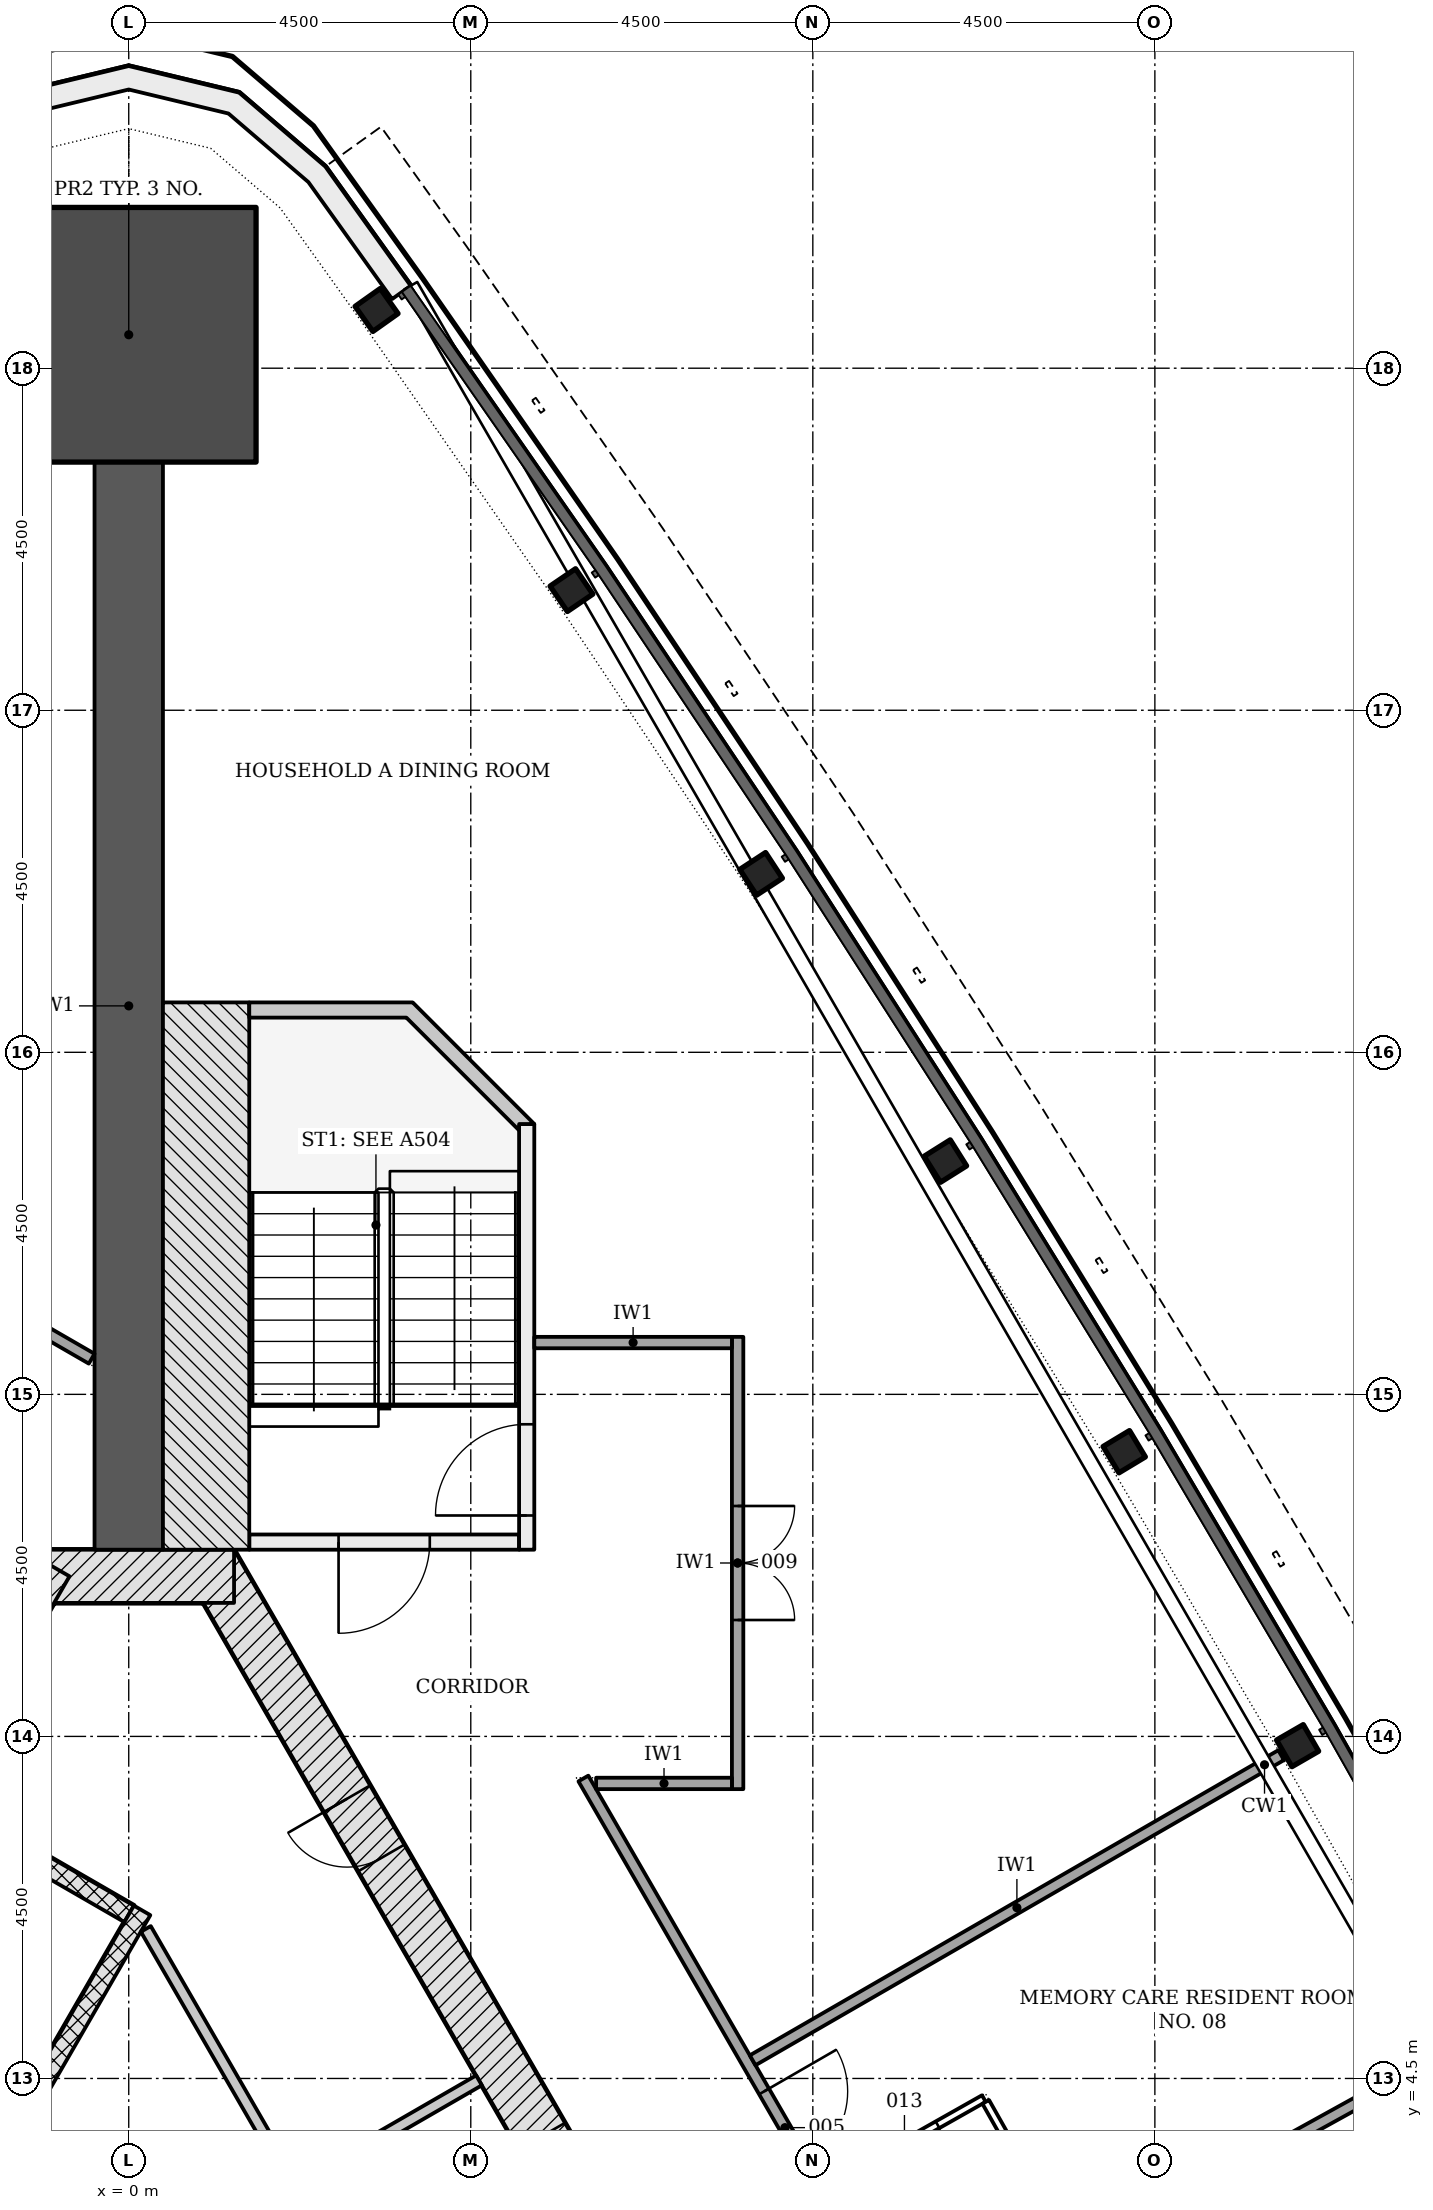
"""IFC4 building model, lengths in metres.
Left out: names, types, materials, properties, quantities, classifications, styles, units other than length and angle.
Written with IfcOpenShell. Run it as: python <this file> out.ifc"""

import sys

from ifc_helpers import new_model, si_unit, direction, frame, frame_2d, origin, origin_2d, place, context, subcontext, project, spatial, polyline, rectangle, i_section, outline, extrude, element, fill, save


model = new_model("IFC4")
c1 = context("Model", 3, precision=1e-05, world=origin(), true_north=direction((0.0, 1.0)))
c2 = subcontext(c1, "Body", "Model", "MODEL_VIEW")
j1 = project(units=[si_unit("LENGTHUNIT", "METRE"), si_unit("PLANEANGLEUNIT", "RADIAN")], contexts=[c1])
p1 = place(None, origin())
s1 = spatial("IfcSite", under=j1, at=p1, CompositionType="ELEMENT")
p2 = place(p1, origin())
s2 = spatial("IfcBuilding", under=s1, at=p2, CompositionType="ELEMENT")
p3 = place(p2, frame((0.0, 0.0, 34.8)))
s3 = spatial("IfcBuildingStorey", under=s2, at=p3, CompositionType="ELEMENT", Elevation=34.8)
p4 = place(p3, frame((10.311, -4.703, -0.2), z_axis=(0.0, 0.0, 1.0), x_axis=(-0.500001446645, 0.866024568562, 0.0)))
e1 = element("IfcWall", 1, at=p4, inside=s3, PredefinedType="SHEAR", context=c2, shape_type="SweptSolid", body=[
    extrude(rectangle(XDim=18.458, YDim=0.7, at=frame_2d((9.229, 0.0))), origin(), (0.0, 0.0, 1.0), 3.6),
])
p5 = place(p4, frame((6.5, 0.0, 0.2)))
e2 = element("IfcOpeningElement", 2, at=p5, cuts=e1, PredefinedType="OPENING", context=c2, shape_type="SweptSolid", body=[
    extrude(rectangle(XDim=1.0, YDim=2.1, at=frame_2d((0.5, 1.05))), frame((0.0, 0.36, 0.0), z_axis=(0.0, -1.0, 0.0), x_axis=(1.0, 0.0, 0.0)), (0.0, 0.0, 1.0), 0.72),
])
p6 = place(p4, frame((2.902, 0.0, 0.2)))
e3 = element("IfcOpeningElement", 3, at=p6, cuts=e1, PredefinedType="OPENING", context=c2, shape_type="SweptSolid", body=[
    extrude(rectangle(XDim=0.9, YDim=2.1, at=frame_2d((0.45, 1.05))), frame((0.0, 0.36, 0.0), z_axis=(0.0, -1.0, 0.0), x_axis=(1.0, 0.0, 0.0)), (0.0, 0.0, 1.0), 0.72),
])
p7 = place(p4, frame((8.75, 0.0, 0.2)))
e4 = element("IfcOpeningElement", 4, at=p7, cuts=e1, PredefinedType="OPENING", context=c2, shape_type="SweptSolid", body=[
    extrude(rectangle(XDim=1.0, YDim=2.1, at=frame_2d((0.5, 1.05))), frame((0.0, 0.36, 0.0), z_axis=(0.0, -1.0, 0.0), x_axis=(1.0, 0.0, 0.0)), (0.0, 0.0, 1.0), 0.72),
])
p8 = place(p4, frame((13.977, 0.0, 0.2)))
e5 = element("IfcOpeningElement", 5, at=p8, cuts=e1, PredefinedType="OPENING", context=c2, shape_type="SweptSolid", body=[
    extrude(rectangle(XDim=0.9, YDim=2.1, at=frame_2d((0.45, 1.05))), frame((0.0, 0.36, 0.0), z_axis=(0.0, -1.0, 0.0), x_axis=(1.0, 0.0, 0.0)), (0.0, 0.0, 1.0), 0.72),
])
p9 = place(p3, frame((1.386, 11.106, -0.2), z_axis=(0.0, 0.0, 1.0), x_axis=(-1.0, 0.0, 0.0)))
e6 = element("IfcWall", 6, at=p9, inside=s3, PredefinedType="SHEAR", context=c2, shape_type="SweptSolid", body=[
    extrude(rectangle(XDim=2.771, YDim=0.7, at=frame_2d((1.386, 0.0))), origin(), (0.0, 0.0, 1.0), 3.6),
])
p10 = place(p3, frame((-1.083, 11.281, -0.2), z_axis=(0.0, 0.0, 1.0), x_axis=(-0.500001446645, -0.866024568562, 0.0)))
e7 = element("IfcWall", 7, at=p10, inside=s3, PredefinedType="SHEAR", context=c2, shape_type="SweptSolid", body=[
    extrude(rectangle(XDim=18.458, YDim=0.7, at=frame_2d((9.229, 0.0))), origin(), (0.0, 0.0, 1.0), 3.6),
])
p11 = place(p10, frame((8.979, 0.0, 0.2)))
e8 = element("IfcOpeningElement", 8, at=p11, cuts=e7, PredefinedType="OPENING", context=c2, shape_type="SweptSolid", body=[
    extrude(rectangle(XDim=1.2, YDim=2.1, at=frame_2d((0.6, 1.05))), frame((0.0, 0.36, 0.0), z_axis=(0.0, -1.0, 0.0), x_axis=(1.0, 0.0, 0.0)), (0.0, 0.0, 1.0), 0.72),
])
p12 = place(p10, frame((11.029, 0.0, 0.2)))
e9 = element("IfcOpeningElement", 9, at=p12, cuts=e7, PredefinedType="OPENING", context=c2, shape_type="SweptSolid", body=[
    extrude(rectangle(XDim=1.2, YDim=2.1, at=frame_2d((0.6, 1.05))), frame((0.0, 0.36, 0.0), z_axis=(0.0, -1.0, 0.0), x_axis=(1.0, 0.0, 0.0)), (0.0, 0.0, 1.0), 0.72),
])
p13 = place(p3, frame((0.0, 11.456, -0.2), z_axis=(0.0, 0.0, 1.0), x_axis=(0.0, 1.0, 0.0)))
e10 = element("IfcWall", 10, at=p13, inside=s3, PredefinedType="SHEAR", context=c2, shape_type="SweptSolid", body=[
    extrude(rectangle(XDim=14.309, YDim=0.9, at=frame_2d((7.154, 0.0))), origin(), (0.0, 0.0, 1.0), 3.6),
])
p14 = place(p3, frame((0.0, 27.44, -0.2), z_axis=(0.0, 0.0, 1.0), x_axis=(0.0, 1.0, 0.0)))
e11 = element("IfcColumn", 11, at=p14, inside=s3, PredefinedType="COLUMN", context=c2, shape_type="SweptSolid", body=[
    extrude(rectangle(XDim=3.35, YDim=3.35, at=origin_2d()), origin(), (0.0, 0.0, 1.0), 3.6),
])
for number, where, z_axis, x_axis in (
    (12, (15.378, 8.878, -0.2), (0.0, 0.0, 1.0), (-0.5, 0.866, 0.0)),
    (13, (13.097, 12.745, -0.2), (0.0, 0.0, 1.0), (-0.516, 0.857, 0.0)),
    (14, (10.744, 16.569, -0.2), (0.0, 0.0, 1.0), (-0.532, 0.847, 0.0)),
    (15, (8.319, 20.348, -0.2), (0.0, 0.0, 1.0), (-0.548, 0.837, 0.0)),
    (16, (5.825, 24.081, -0.2), (0.0, 0.0, 1.0), (-0.563, 0.826, 0.0)),
    (17, (3.26, 27.766, -0.2), (0.0, 0.0, 1.0), (-0.579, 0.815, 0.0)),
):
    element("IfcColumn", number, at=place(p3, frame(where, z_axis=z_axis, x_axis=x_axis)), inside=s3, PredefinedType="COLUMN", context=c2, shape_type="SweptSolid", body=[
        extrude(i_section(OverallWidth=0.404, OverallDepth=0.406, WebThickness=0.027, FlangeThickness=0.044, FilletRadius=0.015, at=origin_2d()), origin(), (0.0, 0.0, 1.0), 3.6),
    ])
p15 = place(p3, origin())
e18 = element("IfcWall", 18, at=p15, inside=s3, PredefinedType="NOTDEFINED", context=c2, shape_type="SweptSolid", body=[
    extrude(outline(polyline([(3.709, 28.084), (2.586, 29.652), (1.453, 30.625), (0.0, 30.975), (-1.453, 30.625), (-2.586, 29.652), (-3.709, 28.084), (-3.465, 27.91), (-2.364, 29.448), (-1.312, 30.351), (0.0, 30.667), (1.312, 30.351), (2.364, 29.448), (3.465, 27.91), (3.709, 28.084)])), origin(), (0.0, 0.0, 1.0), 3.3),
])
p16 = place(p3, frame((-2.506, 8.115, -0.2), z_axis=(0.0, 0.0, 1.0), x_axis=(0.865996321171, -0.50005036918, 0.0)))
e19 = element("IfcWall", 19, at=p16, inside=s3, PredefinedType="PARTITIONING", context=c2, shape_type="SweptSolid", body=[
    extrude(rectangle(XDim=2.9, YDim=0.25, at=frame_2d((1.45, 0.0))), origin(), (0.0, 0.0, 1.0), 3.6),
])
p17 = place(p3, frame((0.176, 6.711, 0.0), z_axis=(0.0, 0.0, 1.0), x_axis=(-0.500004227369, -0.866022963098, 0.0)))
e20 = element("IfcWall", 20, at=p17, inside=s3, PredefinedType="PARTITIONING", context=c2, shape_type="SweptSolid", body=[
    extrude(rectangle(XDim=11.8, YDim=0.25, at=frame_2d((5.9, 0.0))), origin(), (0.0, 0.0, 1.0), 3.4),
])
p18 = place(p3, frame((3.546, 0.715, 0.0), z_axis=(0.0, 0.0, 1.0), x_axis=(-0.50002895357, 0.866008686788, 0.0)))
e21 = element("IfcWall", 21, at=p18, inside=s3, PredefinedType="PARTITIONING", context=c2, shape_type="SweptSolid", body=[
    extrude(rectangle(XDim=6.642, YDim=0.15, at=frame_2d((3.321, 0.0))), origin(), (0.0, 0.0, 1.0), 3.4),
])
p19 = place(p3, frame((2.248, 3.112, 0.0), z_axis=(0.0, 0.0, 1.0), x_axis=(0.866012511928, 0.500022328685, 0.0)))
e22 = element("IfcWall", 22, at=p19, inside=s3, PredefinedType="PARTITIONING", context=c2, shape_type="SweptSolid", body=[
    extrude(rectangle(XDim=2.725, YDim=0.15, at=frame_2d((1.363, 0.0))), origin(), (0.0, 0.0, 1.0), 3.4),
])
p20 = place(p3, frame((5.135, 11.556, -0.2), z_axis=(0.0, 0.0, 1.0), x_axis=(-1.0, 0.0, 0.0)))
e23 = element("IfcWall", 23, at=p20, inside=s3, PredefinedType="SHEAR", context=c2, shape_type="SweptSolid", body=[
    extrude(rectangle(XDim=3.55, YDim=0.2, at=frame_2d((1.775, 0.0))), origin(), (0.0, 0.0, 1.0), 3.6),
])
p21 = place(p20, frame((1.175, 0.0, 0.2)))
e24 = element("IfcOpeningElement", 24, at=p21, cuts=e23, PredefinedType="OPENING", context=c2, shape_type="SweptSolid", body=[
    extrude(rectangle(XDim=1.2, YDim=2.1, at=frame_2d((0.6, 1.05))), frame((0.0, 0.11, 0.0), z_axis=(0.0, -1.0, 0.0), x_axis=(1.0, 0.0, 0.0)), (0.0, 0.0, 1.0), 0.22),
])
p22 = place(p3, frame((5.236, 11.456, -0.2), z_axis=(0.0, 0.0, 1.0), x_axis=(0.0, 1.0, 0.0)))
e25 = element("IfcWall", 25, at=p22, inside=s3, PredefinedType="SHEAR", context=c2, shape_type="SweptSolid", body=[
    extrude(rectangle(XDim=5.6, YDim=0.2, at=frame_2d((2.8, 0.0))), origin(), (0.0, 0.0, 1.0), 3.6),
])
p23 = place(p22, frame((0.45, 0.0, 0.2)))
e26 = element("IfcOpeningElement", 26, at=p23, cuts=e25, PredefinedType="OPENING", context=c2, shape_type="SweptSolid", body=[
    extrude(rectangle(XDim=1.2, YDim=2.1, at=frame_2d((0.6, 1.05))), frame((0.0, 0.11, 0.0), z_axis=(0.0, -1.0, 0.0), x_axis=(1.0, 0.0, 0.0)), (0.0, 0.0, 1.0), 0.22),
])
p24 = place(p3, frame((1.018, 11.456, -0.2), z_axis=(0.0, 0.0, 1.0), x_axis=(0.0, 1.0, 0.0)))
e27 = element("IfcWall", 27, at=p24, inside=s3, PredefinedType="SHEAR", context=c2, shape_type="SweptSolid", body=[
    extrude(rectangle(XDim=7.2, YDim=1.136, at=frame_2d((3.6, 0.0))), origin(), (0.0, 0.0, 1.0), 3.6),
])
p25 = place(p3, frame((0.0, 0.0, -0.2)))
e28 = element("IfcWall", 28, at=p25, inside=s3, PredefinedType="SHEAR", context=c2, shape_type="SweptSolid", body=[
    extrude(outline(polyline([(5.336, 17.056), (3.736, 18.656), (1.586, 18.656), (1.586, 18.456), (3.653, 18.456), (5.135, 16.974), (5.135, 17.056), (5.135, 17.056), (5.135, 17.056), (5.135, 17.056), (5.135, 17.056), (5.135, 17.056), (5.135, 17.056), (5.135, 17.056), (5.135, 17.056), (5.135, 17.056), (5.135, 17.056), (5.135, 17.056), (5.135, 17.056), (5.135, 17.056), (5.135, 17.056), (5.135, 17.056), (5.135, 17.056), (5.336, 17.056)])), origin(), (0.0, 0.0, 1.0), 3.6),
])
p26 = place(p3, frame((5.981, 8.446, 0.0), z_axis=(0.0, 0.0, 1.0), x_axis=(0.499996620721, -0.866027354803, 0.0)))
e29 = element("IfcWall", 29, at=p26, inside=s3, PredefinedType="PARTITIONING", context=c2, shape_type="SweptSolid", body=[
    extrude(rectangle(XDim=15.057, YDim=0.15, at=frame_2d((7.528, 0.0))), origin(), (0.0, 0.0, 1.0), 2.768),
])
p27 = place(p26, frame((11.311, 0.0, 0.0)))
e30 = element("IfcOpeningElement", 30, at=p27, cuts=e29, PredefinedType="OPENING", context=c2, shape_type="SweptSolid", body=[
    extrude(rectangle(XDim=1.0, YDim=2.1, at=frame_2d((0.5, 1.05))), frame((0.0, 0.085, 0.0), z_axis=(0.0, -1.0, 0.0), x_axis=(1.0, 0.0, 0.0)), (0.0, 0.0, 1.0), 0.17),
])
p28 = place(p26, frame((4.754, 0.0, 0.0)))
e31 = element("IfcOpeningElement", 31, at=p28, cuts=e29, PredefinedType="OPENING", context=c2, shape_type="SweptSolid", body=[
    extrude(rectangle(XDim=1.1, YDim=2.1, at=frame_2d((0.55, 1.05))), frame((0.0, 0.085, 0.0), z_axis=(0.0, -1.0, 0.0), x_axis=(1.0, 0.0, 0.0)), (0.0, 0.0, 1.0), 0.17),
])
p29 = place(p3, frame((8.01, 14.256, 0.0), z_axis=(0.0, 0.0, 1.0), x_axis=(0.0, -1.0, 0.0)))
e32 = element("IfcWall", 32, at=p29, inside=s3, PredefinedType="PARTITIONING", context=c2, shape_type="SweptSolid", body=[
    extrude(rectangle(XDim=5.95, YDim=0.15, at=frame_2d((2.975, 0.0))), origin(), (0.0, 0.0, 1.0), 2.768),
])
p30 = place(p29, frame((2.225, 0.0, 0.0)))
e33 = element("IfcOpeningElement", 33, at=p30, cuts=e32, PredefinedType="OPENING", context=c2, shape_type="SweptSolid", body=[
    extrude(rectangle(XDim=1.5, YDim=2.1, at=frame_2d((0.75, 1.05))), frame((0.0, 0.085, 0.0), z_axis=(0.0, -1.0, 0.0), x_axis=(1.0, 0.0, 0.0)), (0.0, 0.0, 1.0), 0.17),
])
p31 = place(p3, frame((-5.312, 16.755, 0.0), z_axis=(0.0, 0.0, 1.0), x_axis=(0.866028693448, -0.499994302092, 0.0)))
e34 = element("IfcWall", 34, at=p31, inside=s3, PredefinedType="PARTITIONING", context=c2, shape_type="SweptSolid", body=[
    extrude(rectangle(XDim=5.571, YDim=0.15, at=frame_2d((2.786, 0.0))), origin(), (0.0, 0.0, 1.0), 3.4),
])
p32 = place(p31, frame((2.295, 0.0, 0.0)))
e35 = element("IfcOpeningElement", 35, at=p32, cuts=e34, PredefinedType="OPENING", context=c2, shape_type="SweptSolid", body=[
    extrude(rectangle(XDim=1.0, YDim=2.1, at=frame_2d((0.5, 1.05))), frame((0.0, 0.085, 0.0), z_axis=(0.0, -1.0, 0.0), x_axis=(1.0, 0.0, 0.0)), (0.0, 0.0, 1.0), 0.17),
])
p33 = place(p3, frame((5.336, 14.181, 0.0), z_axis=(0.0, 0.0, 1.0), x_axis=(1.0, 0.0, 0.0)))
e36 = element("IfcWall", 36, at=p33, inside=s3, PredefinedType="PARTITIONING", context=c2, shape_type="SweptSolid", body=[
    extrude(rectangle(XDim=2.6, YDim=0.15, at=frame_2d((1.3, 0.0))), origin(), (0.0, 0.0, 1.0), 2.923),
])
p34 = place(p3, frame((6.149, 8.381, 0.0), z_axis=(0.0, 0.0, 1.0), x_axis=(1.0, 0.0, 0.0)))
e37 = element("IfcWall", 37, at=p34, inside=s3, PredefinedType="PARTITIONING", context=c2, shape_type="SweptSolid", body=[
    extrude(rectangle(XDim=1.787, YDim=0.15, at=frame_2d((0.894, 0.0))), origin(), (0.0, 0.0, 1.0), 2.768),
])
p35 = place(p3, frame((15.161, 8.753, 0.0), z_axis=(0.0, 0.0, 1.0), x_axis=(-0.86601695431, -0.500014634633, 0.0)))
e38 = element("IfcWall", 38, at=p35, inside=s3, PredefinedType="PARTITIONING", context=c2, shape_type="SweptSolid", body=[
    extrude(rectangle(XDim=8.029, YDim=0.15, at=frame_2d((4.014, 0.0))), origin(), (0.0, 0.0, 1.0), 2.768),
])
p36 = place(p3, frame((17.367, 4.848, 0.0), z_axis=(0.0, 0.0, 1.0), x_axis=(-0.875233702412, -0.483700285469, 0.0)))
e39 = element("IfcWall", 39, at=p36, inside=s3, PredefinedType="PARTITIONING", context=c2, shape_type="SweptSolid", body=[
    extrude(rectangle(XDim=7.986, YDim=0.15, at=frame_2d((3.993, 0.0))), origin(), (0.0, 0.0, 1.0), 2.768),
])
p37 = place(p3, frame((11.25, 4.235, 0.0), z_axis=(0.0, 0.0, 1.0), x_axis=(-0.870673532045, -0.491861363188, 0.0)))
e40 = element("IfcWall", 40, at=p37, inside=s3, PredefinedType="PARTITIONING", context=c2, shape_type="SweptSolid", body=[
    extrude(rectangle(XDim=2.382, YDim=0.1, at=frame_2d((1.191, 0.0))), origin(), (0.0, 0.0, 1.0), 3.4),
])
p38 = place(p37, frame((0.7, 0.0, 0.0)))
e41 = element("IfcOpeningElement", 41, at=p38, cuts=e40, PredefinedType="OPENING", context=c2, shape_type="SweptSolid", body=[
    extrude(rectangle(XDim=1.0, YDim=2.1, at=frame_2d((0.5, 1.05))), frame((0.0, 0.06, 0.0), z_axis=(0.0, -1.0, 0.0), x_axis=(1.0, 0.0, 0.0)), (0.0, 0.0, 1.0), 0.12),
])
p39 = place(p3, frame((12.405, 2.192, 0.0), z_axis=(0.0, 0.0, 1.0), x_axis=(-0.491840077016, 0.870685556697, 0.0)))
e42 = element("IfcWall", 42, at=p39, inside=s3, PredefinedType="PARTITIONING", context=c2, shape_type="SweptSolid", body=[
    extrude(rectangle(XDim=2.297, YDim=0.1, at=frame_2d((1.148, 0.0))), origin(), (0.0, 0.0, 1.0), 2.768),
])
p40 = place(p8, origin())
e43 = element("IfcDoor", 43, at=p40, inside=s3, OperationType="SINGLE_SWING_RIGHT", PredefinedType="DOOR", context=c2, shape_type="SweptSolid", body=[
    extrude(rectangle(XDim=0.9, YDim=2.1, at=frame_2d((0.45, 1.05))), frame((0.0, 0.075, 0.0), z_axis=(0.0, -1.0, 0.0), x_axis=(1.0, 0.0, 0.0)), (0.0, 0.0, 1.0), 0.15),
])
fill(e5, e43)
p41 = place(p21, origin())
e44 = element("IfcDoor", 44, at=p41, inside=s3, OperationType="SINGLE_SWING_RIGHT", PredefinedType="DOOR", context=c2, shape_type="SweptSolid", body=[
    extrude(rectangle(XDim=1.2, YDim=2.1, at=frame_2d((0.6, 1.05))), frame((0.0, 0.025, 0.0), z_axis=(0.0, -1.0, 0.0), x_axis=(1.0, 0.0, 0.0)), (0.0, 0.0, 1.0), 0.05),
])
fill(e24, e44)
p42 = place(p23, origin())
e45 = element("IfcDoor", 45, at=p42, inside=s3, OperationType="SINGLE_SWING_LEFT", PredefinedType="DOOR", context=c2, shape_type="SweptSolid", body=[
    extrude(rectangle(XDim=1.2, YDim=2.1, at=frame_2d((0.6, 1.05))), frame((0.0, 0.025, 0.0), z_axis=(0.0, -1.0, 0.0), x_axis=(1.0, 0.0, 0.0)), (0.0, 0.0, 1.0), 0.05),
])
fill(e26, e45)
p43 = place(p28, origin())
e46 = element("IfcDoor", 46, at=p43, inside=s3, OperationType="SINGLE_SWING_LEFT", PredefinedType="DOOR", context=c2, shape_type="SweptSolid", body=[
    extrude(rectangle(XDim=1.1, YDim=2.1, at=frame_2d((0.55, 1.05))), frame((0.0, 0.025, 0.0), z_axis=(0.0, -1.0, 0.0), x_axis=(1.0, 0.0, 0.0)), (0.0, 0.0, 1.0), 0.05),
])
fill(e31, e46)
p44 = place(p30, origin())
e47 = element("IfcDoor", 47, at=p44, inside=s3, OperationType="DOUBLE_DOOR_SINGLE_SWING", PredefinedType="DOOR", context=c2, shape_type="SweptSolid", body=[
    extrude(rectangle(XDim=1.5, YDim=2.1, at=frame_2d((0.75, 1.05))), frame((0.0, 0.025, 0.0), z_axis=(0.0, -1.0, 0.0), x_axis=(1.0, 0.0, 0.0)), (0.0, 0.0, 1.0), 0.05),
])
fill(e33, e47)
p45 = place(p38, origin())
e48 = element("IfcDoor", 48, at=p45, inside=s3, OperationType="SINGLE_SWING_RIGHT", PredefinedType="DOOR", context=c2, shape_type="SweptSolid", body=[
    extrude(rectangle(XDim=1.0, YDim=2.1, at=frame_2d((0.5, 1.05))), frame((0.0, 0.025, 0.0), z_axis=(0.0, -1.0, 0.0), x_axis=(1.0, 0.0, 0.0)), (0.0, 0.0, 1.0), 0.05),
])
fill(e41, e48)
save(model, sys.argv[1])
